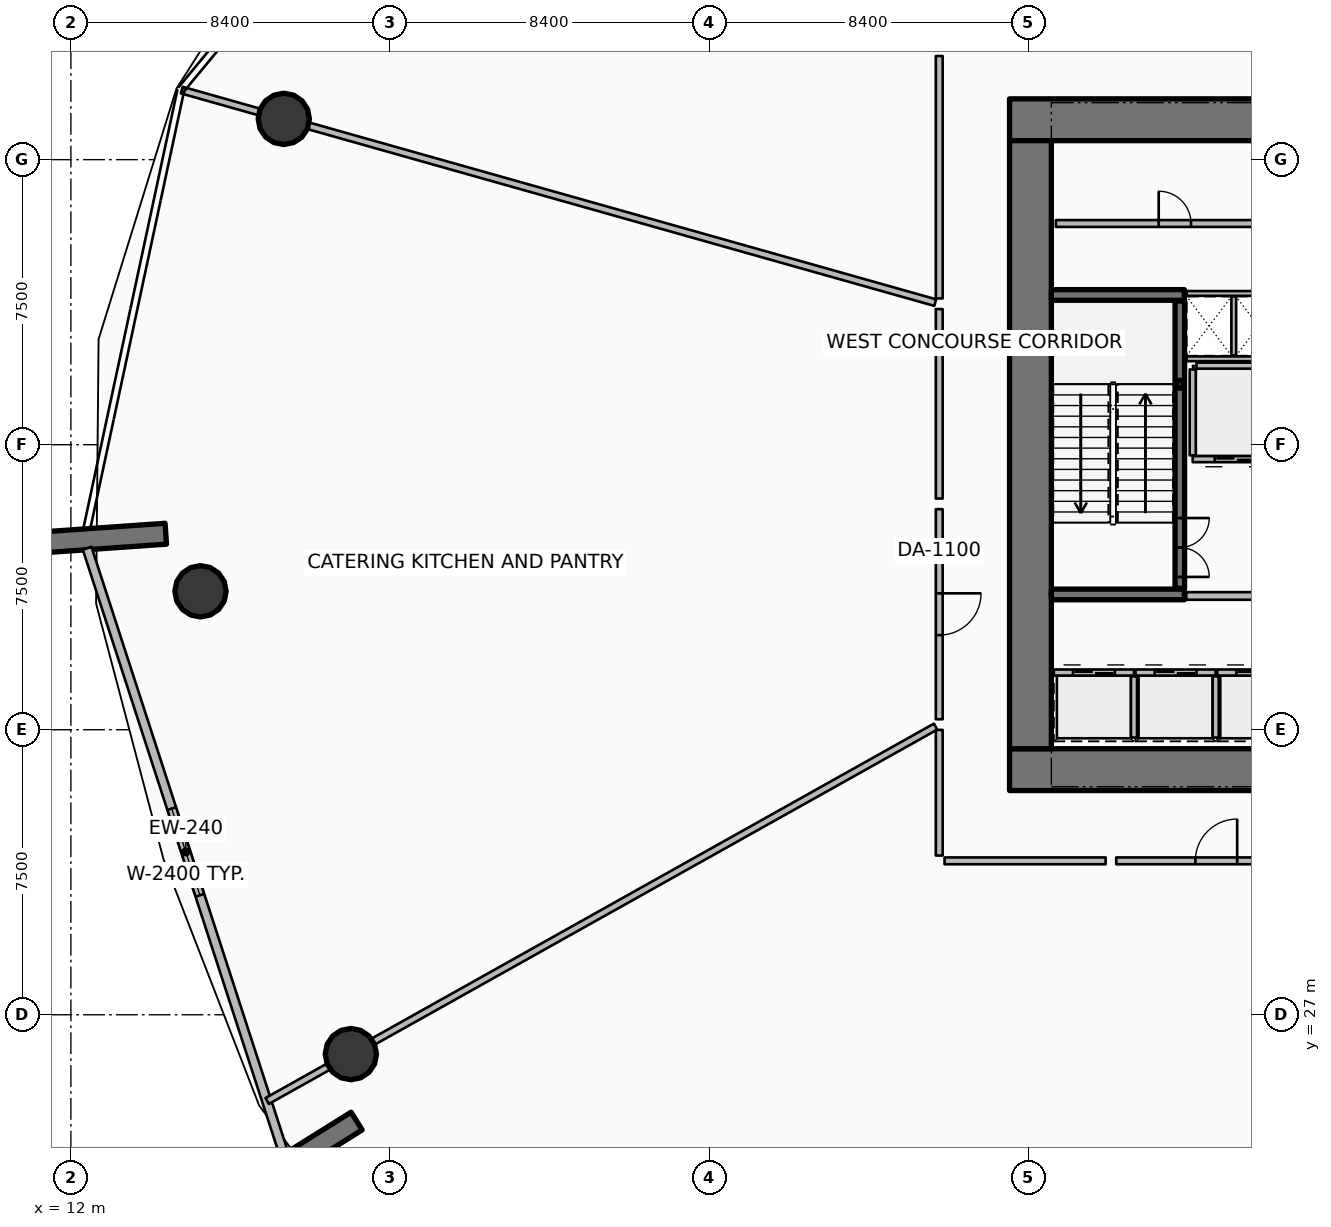
"""IFC4 building model, lengths in metres.
Left out: names, types, materials, properties, quantities, classifications, styles, units other than length and angle.
Written with IfcOpenShell. Run it as: python <this file> out.ifc"""

import sys

from ifc_helpers import new_model, si_unit, direction, frame, frame_2d, origin, origin_2d, place, context, subcontext, project, spatial, rectangle, hollow_rectangle, circle, extrude, element, fill, save


model = new_model("IFC4")
c1 = context("Model", 3, precision=1e-05, world=origin(), true_north=direction((0.0, 1.0)))
c2 = subcontext(c1, "Body", "Model", "MODEL_VIEW")
j1 = project(units=[si_unit("LENGTHUNIT", "METRE"), si_unit("PLANEANGLEUNIT", "RADIAN")], contexts=[c1])
p1 = place(None, origin())
s1 = spatial("IfcSite", under=j1, at=p1, CompositionType="ELEMENT")
p2 = place(p1, origin())
s2 = spatial("IfcBuilding", under=s1, at=p2, CompositionType="ELEMENT")
p3 = place(p2, frame((0.0, 0.0, 7.2)))
s3 = spatial("IfcBuildingStorey", under=s2, at=p3, CompositionType="ELEMENT", Elevation=7.2)
for number, where, z_axis, x_axis in (
    (1, (36.7, 33.45, 0.0), (0.0, 0.0, 1.0), (1.0, 0.0, 0.0)),
    (2, (36.7, 50.55, 0.0), (0.0, 0.0, 1.0), (1.0, 0.0, 0.0)),
):
    element("IfcWall", number, at=place(p3, frame(where, z_axis=z_axis, x_axis=x_axis)), inside=s3, PredefinedType="SHEAR", context=c2, shape_type="SweptSolid", body=[
        extrude(rectangle(XDim=10.2, YDim=1.1, at=frame_2d((5.1, 0.0))), origin(), (0.0, 0.0, 1.0), 4.8),
    ])
p4 = place(p3, frame((37.25, 34.0, 0.0), z_axis=(0.0, 0.0, 1.0), x_axis=(0.0, 1.0, 0.0)))
e3 = element("IfcWall", 3, at=p4, inside=s3, PredefinedType="SHEAR", context=c2, shape_type="SweptSolid", body=[
    extrude(rectangle(XDim=16.0, YDim=1.1, at=frame_2d((8.0, 0.0))), origin(), (0.0, 0.0, 1.0), 4.8),
])
for number, where, z_axis, x_axis in (
    (4, (37.8, 38.06, 0.0), (0.0, 0.0, 1.0), (1.0, 0.0, 0.0)),
    (5, (37.8, 45.94, 0.0), (0.0, 0.0, 1.0), (1.0, 0.0, 0.0)),
):
    element("IfcWall", number, at=place(p3, frame(where, z_axis=z_axis, x_axis=x_axis)), inside=s3, PredefinedType="SHEAR", context=c2, shape_type="SweptSolid", body=[
        extrude(rectangle(XDim=3.5, YDim=0.28, at=frame_2d((1.75, 0.0))), origin(), (0.0, 0.0, 1.0), 4.8),
    ])
p5 = place(p3, frame((41.18, 43.59, 0.0), z_axis=(0.0, 0.0, 1.0), x_axis=(1.0, 0.0, 0.0)))
e6 = element("IfcColumn", 6, at=p5, inside=s3, PredefinedType="COLUMN", context=c2, shape_type="SweptSolid", body=[
    extrude(hollow_rectangle(XDim=0.2, YDim=0.2, WallThickness=0.01, InnerFilletRadius=0.01, OuterFilletRadius=0.02, at=origin_2d()), origin(), (0.0, 0.0, 1.0), 2.195),
])
for number, where, z_axis, x_axis in (
    (7, (14.497, 39.657, 0.0), (0.0, 0.0, 1.0), (-0.998, -0.07, 0.0)),
    (8, (19.519, 24.203, 0.0), (0.0, 0.0, 1.0), (-0.848, -0.53, 0.0)),
):
    element("IfcWall", number, at=place(p3, frame(where, z_axis=z_axis, x_axis=x_axis)), inside=s3, PredefinedType="SOLIDWALL", context=c2, shape_type="SweptSolid", body=[
        extrude(rectangle(XDim=3.5, YDim=0.55, at=frame_2d((1.75, 0.0))), origin(), (0.0, 0.0, 1.0), 4.8),
    ])
for number, where, z_axis, x_axis in (
    (9, (17.602, 50.573, 0.0), (0.0, 0.0, 1.0), (1.0, 0.0, 0.0)),
    (10, (15.41, 38.143, 0.0), (0.0, 0.0, 1.0), (1.0, 0.0, 0.0)),
    (11, (19.367, 25.965, 0.0), (0.0, 0.0, 1.0), (1.0, 0.0, 0.0)),
):
    element("IfcColumn", number, at=place(p3, frame(where, z_axis=z_axis, x_axis=x_axis)), inside=s3, PredefinedType="COLUMN", context=c2, shape_type="SweptSolid", body=[
        extrude(circle(Radius=0.675, at=origin_2d()), origin(), (0.0, 0.0, 1.0), 4.48),
    ])
p6 = place(p3, frame((12.427, 39.275, 0.0), z_axis=(0.0, 0.0, 1.0), x_axis=(0.309022005354, -0.951054888115, 0.0)))
e12 = element("IfcWall", 12, at=p6, inside=s3, PredefinedType="SOLIDWALL", context=c2, shape_type="SweptSolid", body=[
    extrude(rectangle(XDim=16.803, YDim=0.24, at=frame_2d((8.401, 0.0))), origin(), (0.0, 0.0, 1.0), 3.43),
])
p7 = place(p6, frame((7.201, 0.0, 0.85)))
e13 = element("IfcOpeningElement", 13, at=p7, cuts=e12, PredefinedType="OPENING", context=c2, shape_type="SweptSolid", body=[
    extrude(rectangle(XDim=2.4, YDim=2.1, at=frame_2d((1.2, 1.05))), frame((0.0, 0.13, 0.0), z_axis=(0.0, -1.0, 0.0), x_axis=(1.0, 0.0, 0.0)), (0.0, 0.0, 1.0), 0.26),
])
p8 = place(p3, frame((41.18, 38.22, 0.0), z_axis=(0.0, 0.0, 1.0), x_axis=(0.0, 1.0, 0.0)))
e14 = element("IfcWall", 14, at=p8, inside=s3, PredefinedType="SOLIDWALL", context=c2, shape_type="SweptSolid", body=[
    extrude(rectangle(XDim=7.56, YDim=0.25, at=frame_2d((3.78, 0.0))), origin(), (0.0, 0.0, 1.0), 4.48),
])
p9 = place(p8, frame((0.3, 0.0, 0.0)))
e15 = element("IfcOpeningElement", 15, at=p9, cuts=e14, PredefinedType="OPENING", context=c2, shape_type="SweptSolid", body=[
    extrude(rectangle(XDim=1.55, YDim=2.15, at=frame_2d((0.775, 1.075))), frame((0.0, 0.135, 0.0), z_axis=(0.0, -1.0, 0.0), x_axis=(1.0, 0.0, 0.0)), (0.0, 0.0, 1.0), 0.27),
])
p10 = place(p3, frame((37.865, 36.005, 0.0), z_axis=(0.0, 0.0, 1.0), x_axis=(1.0, 0.0, 0.0)))
e16 = element("IfcWall", 16, at=p10, inside=s3, PredefinedType="PARTITIONING", context=c2, shape_type="SweptSolid", body=[
    extrude(rectangle(XDim=2.11, YDim=0.16, at=frame_2d((1.055, 0.0))), origin(), (0.0, 0.0, 1.0), 4.48),
])
p11 = place(p10, frame((0.505, 0.0, 0.0)))
e17 = element("IfcOpeningElement", 17, at=p11, cuts=e16, PredefinedType="OPENING", context=c2, shape_type="SweptSolid", body=[
    extrude(rectangle(XDim=1.1, YDim=2.1, at=frame_2d((0.55, 1.05))), frame((0.0, 0.09, 0.0), z_axis=(0.0, -1.0, 0.0), x_axis=(1.0, 0.0, 0.0)), (0.0, 0.0, 1.0), 0.18),
])
p12 = place(p3, frame((39.975, 34.295, 0.0), z_axis=(0.0, 0.0, 1.0), x_axis=(0.0, 1.0, 0.0)))
e18 = element("IfcWall", 18, at=p12, inside=s3, PredefinedType="PARTITIONING", context=c2, shape_type="SweptSolid", body=[
    extrude(rectangle(XDim=1.61, YDim=0.16, at=frame_2d((0.805, 0.0))), origin(), (0.0, 0.0, 1.0), 4.48),
])
p13 = place(p3, frame((40.015, 36.005, 0.0), z_axis=(0.0, 0.0, 1.0), x_axis=(1.0, 0.0, 0.0)))
e19 = element("IfcWall", 19, at=p13, inside=s3, PredefinedType="PARTITIONING", context=c2, shape_type="SweptSolid", body=[
    extrude(rectangle(XDim=2.11, YDim=0.16, at=frame_2d((1.055, 0.0))), origin(), (0.0, 0.0, 1.0), 4.48),
])
p14 = place(p13, frame((0.505, 0.0, 0.0)))
e20 = element("IfcOpeningElement", 20, at=p14, cuts=e19, PredefinedType="OPENING", context=c2, shape_type="SweptSolid", body=[
    extrude(rectangle(XDim=1.1, YDim=2.1, at=frame_2d((0.55, 1.05))), frame((0.0, 0.09, 0.0), z_axis=(0.0, -1.0, 0.0), x_axis=(1.0, 0.0, 0.0)), (0.0, 0.0, 1.0), 0.18),
])
p15 = place(p3, frame((42.125, 34.295, 0.0), z_axis=(0.0, 0.0, 1.0), x_axis=(0.0, 1.0, 0.0)))
e21 = element("IfcWall", 21, at=p15, inside=s3, PredefinedType="PARTITIONING", context=c2, shape_type="SweptSolid", body=[
    extrude(rectangle(XDim=1.61, YDim=0.16, at=frame_2d((0.805, 0.0))), origin(), (0.0, 0.0, 1.0), 4.48),
])
p16 = place(p3, frame((42.165, 36.005, 0.0), z_axis=(0.0, 0.0, 1.0), x_axis=(1.0, 0.0, 0.0)))
e22 = element("IfcWall", 22, at=p16, inside=s3, PredefinedType="PARTITIONING", context=c2, shape_type="SweptSolid", body=[
    extrude(rectangle(XDim=2.11, YDim=0.16, at=frame_2d((1.055, 0.0))), origin(), (0.0, 0.0, 1.0), 4.48),
])
p17 = place(p16, frame((0.505, 0.0, 0.0)))
e23 = element("IfcOpeningElement", 23, at=p17, cuts=e22, PredefinedType="OPENING", context=c2, shape_type="SweptSolid", body=[
    extrude(rectangle(XDim=1.1, YDim=2.1, at=frame_2d((0.55, 1.05))), frame((0.0, 0.09, 0.0), z_axis=(0.0, -1.0, 0.0), x_axis=(1.0, 0.0, 0.0)), (0.0, 0.0, 1.0), 0.18),
])
p18 = place(p3, frame((43.78, 41.62, 0.0), z_axis=(0.0, 0.0, 1.0), x_axis=(-1.0, 0.0, 0.0)))
e24 = element("IfcWall", 24, at=p18, inside=s3, PredefinedType="PARTITIONING", context=c2, shape_type="SweptSolid", body=[
    extrude(rectangle(XDim=2.26, YDim=0.16, at=frame_2d((1.13, 0.0))), origin(), (0.0, 0.0, 1.0), 4.48),
])
p19 = place(p18, frame((0.58, 0.0, 0.0)))
e25 = element("IfcOpeningElement", 25, at=p19, cuts=e24, PredefinedType="OPENING", context=c2, shape_type="SweptSolid", body=[
    extrude(rectangle(XDim=1.1, YDim=2.1, at=frame_2d((0.55, 1.05))), frame((0.0, 0.09, 0.0), z_axis=(0.0, -1.0, 0.0), x_axis=(1.0, 0.0, 0.0)), (0.0, 0.0, 1.0), 0.18),
])
p20 = place(p3, frame((41.52, 41.72, 0.0), z_axis=(0.0, 0.0, 1.0), x_axis=(0.0, 1.0, 0.0)))
e26 = element("IfcWall", 26, at=p20, inside=s3, PredefinedType="PARTITIONING", context=c2, shape_type="SweptSolid", body=[
    extrude(rectangle(XDim=2.26, YDim=0.16, at=frame_2d((1.13, 0.0))), origin(), (0.0, 0.0, 1.0), 4.48),
])
p21 = place(p3, frame((41.62, 44.08, 0.0), z_axis=(0.0, 0.0, 1.0), x_axis=(1.0, 0.0, 0.0)))
e27 = element("IfcWall", 27, at=p21, inside=s3, PredefinedType="PARTITIONING", context=c2, shape_type="SweptSolid", body=[
    extrude(rectangle(XDim=2.06, YDim=0.16, at=frame_2d((1.03, 0.0))), origin(), (0.0, 0.0, 1.0), 4.48),
])
p22 = place(p3, frame((37.92, 47.82, 0.0), z_axis=(0.0, 0.0, 1.0), x_axis=(1.0, 0.0, 0.0)))
e28 = element("IfcWall", 28, at=p22, inside=s3, PredefinedType="PARTITIONING", context=c2, shape_type="SweptSolid", body=[
    extrude(rectangle(XDim=6.26, YDim=0.18, at=frame_2d((3.13, 0.0))), origin(), (0.0, 0.0, 1.0), 4.48),
])
p23 = place(p22, frame((2.705, 0.0, 0.0)))
e29 = element("IfcOpeningElement", 29, at=p23, cuts=e28, PredefinedType="OPENING", context=c2, shape_type="SweptSolid", body=[
    extrude(rectangle(XDim=0.85, YDim=2.06, at=frame_2d((0.425, 1.03))), frame((0.0, 0.1, 0.0), z_axis=(0.0, -1.0, 0.0), x_axis=(1.0, 0.0, 0.0)), (0.0, 0.0, 1.0), 0.2),
])
p24 = place(p3, frame((41.35, 38.02, 0.0), z_axis=(0.0, 0.0, 1.0), x_axis=(1.0, 0.0, 0.0)))
e30 = element("IfcWall", 30, at=p24, inside=s3, PredefinedType="PARTITIONING", context=c2, shape_type="SweptSolid", body=[
    extrude(rectangle(XDim=5.37, YDim=0.2, at=frame_2d((2.685, 0.0))), origin(), (0.0, 0.0, 1.0), 4.48),
])
p25 = place(p3, frame((41.36, 45.98, 0.0), z_axis=(0.0, 0.0, 1.0), x_axis=(1.0, 0.0, 0.0)))
e31 = element("IfcWall", 31, at=p25, inside=s3, PredefinedType="PARTITIONING", context=c2, shape_type="SweptSolid", body=[
    extrude(rectangle(XDim=5.36, YDim=0.125, at=frame_2d((2.68, 0.0))), origin(), (0.0, 0.0, 1.0), 3.92),
])
p26 = place(p3, frame((41.36, 44.26, 0.0), z_axis=(0.0, 0.0, 1.0), x_axis=(1.0, 0.0, 0.0)))
e32 = element("IfcWall", 32, at=p26, inside=s3, PredefinedType="PARTITIONING", context=c2, shape_type="SweptSolid", body=[
    extrude(rectangle(XDim=2.5, YDim=0.125, at=frame_2d((1.25, 0.0))), origin(), (0.0, 0.0, 1.0), 3.92),
])
p27 = place(p3, frame((42.6, 44.35, 0.0), z_axis=(0.0, 0.0, 1.0), x_axis=(0.0, 1.0, 0.0)))
e33 = element("IfcWall", 33, at=p27, inside=s3, PredefinedType="PARTITIONING", context=c2, shape_type="SweptSolid", body=[
    extrude(rectangle(XDim=1.55, YDim=0.125, at=frame_2d((0.775, 0.0))), origin(), (0.0, 0.0, 1.0), 3.92),
])
p28 = place(p3, frame((34.85, 52.227, 0.0), z_axis=(0.0, 0.0, 1.0), x_axis=(0.0, -1.0, 0.0)))
e34 = element("IfcWall", 34, at=p28, inside=s3, PredefinedType="PARTITIONING", context=c2, shape_type="SweptSolid", body=[
    extrude(rectangle(XDim=6.378, YDim=0.18, at=frame_2d((3.189, 0.0))), origin(), (0.0, 0.0, 1.0), 3.693),
])
p29 = place(p3, frame((34.744, 45.739, 0.0), z_axis=(0.0, 0.0, 1.0), x_axis=(-0.96245531293, 0.271440178702, 0.0)))
e35 = element("IfcWall", 35, at=p29, inside=s3, PredefinedType="PARTITIONING", context=c2, shape_type="SweptSolid", body=[
    extrude(rectangle(XDim=20.6, YDim=0.18, at=frame_2d((10.3, 0.0))), origin(), (0.0, 0.0, 1.0), 3.693),
])
p30 = place(p3, frame((34.85, 45.569, 0.0), z_axis=(0.0, 0.0, 1.0), x_axis=(0.0, -1.0, 0.0)))
e36 = element("IfcWall", 36, at=p30, inside=s3, PredefinedType="PARTITIONING", context=c2, shape_type="SweptSolid", body=[
    extrude(rectangle(XDim=4.985, YDim=0.18, at=frame_2d((2.493, 0.0))), origin(), (0.0, 0.0, 1.0), 3.693),
])
p31 = place(p3, frame((34.85, 40.304, 0.0), z_axis=(0.0, 0.0, 1.0), x_axis=(0.0, -1.0, 0.0)))
e37 = element("IfcWall", 37, at=p31, inside=s3, PredefinedType="PARTITIONING", context=c2, shape_type="SweptSolid", body=[
    extrude(rectangle(XDim=5.528, YDim=0.18, at=frame_2d((2.764, 0.0))), origin(), (0.0, 0.0, 1.0), 3.693),
])
p32 = place(p31, frame((2.214, 0.0, 0.0)))
e38 = element("IfcOpeningElement", 38, at=p32, cuts=e37, PredefinedType="OPENING", context=c2, shape_type="SweptSolid", body=[
    extrude(rectangle(XDim=1.1, YDim=2.1, at=frame_2d((0.55, 1.05))), frame((0.0, 0.1, 0.0), z_axis=(0.0, -1.0, 0.0), x_axis=(1.0, 0.0, 0.0)), (0.0, 0.0, 1.0), 0.2),
])
p33 = place(p3, frame((34.754, 34.582, 0.0), z_axis=(0.0, 0.0, 1.0), x_axis=(-0.872493211438, -0.488626233429, 0.0)))
e39 = element("IfcWall", 39, at=p33, inside=s3, PredefinedType="PARTITIONING", context=c2, shape_type="SweptSolid", body=[
    extrude(rectangle(XDim=20.159, YDim=0.18, at=frame_2d((10.079, 0.0))), origin(), (0.0, 0.0, 1.0), 3.693),
])
p34 = place(p3, frame((34.85, 34.496, 0.0), z_axis=(0.0, 0.0, 1.0), x_axis=(0.0, -1.0, 0.0)))
e40 = element("IfcWall", 40, at=p34, inside=s3, PredefinedType="PARTITIONING", context=c2, shape_type="SweptSolid", body=[
    extrude(rectangle(XDim=3.306, YDim=0.18, at=frame_2d((1.653, 0.0))), origin(), (0.0, 0.0, 1.0), 3.693),
])
p35 = place(p3, frame((34.99, 31.05, 0.0), z_axis=(0.0, 0.0, 1.0), x_axis=(1.0, 0.0, 0.0)))
e41 = element("IfcWall", 41, at=p35, inside=s3, PredefinedType="PARTITIONING", context=c2, shape_type="SweptSolid", body=[
    extrude(rectangle(XDim=4.238, YDim=0.18, at=frame_2d((2.119, 0.0))), origin(), (0.0, 0.0, 1.0), 3.693),
])
p36 = place(p3, frame((39.508, 31.05, 0.0), z_axis=(0.0, 0.0, 1.0), x_axis=(1.0, 0.0, 0.0)))
e42 = element("IfcWall", 42, at=p36, inside=s3, PredefinedType="PARTITIONING", context=c2, shape_type="SweptSolid", body=[
    extrude(rectangle(XDim=5.264, YDim=0.18, at=frame_2d((2.632, 0.0))), origin(), (0.0, 0.0, 1.0), 3.693),
])
p37 = place(p36, frame((2.082, 0.0, 0.0)))
e43 = element("IfcOpeningElement", 43, at=p37, cuts=e42, PredefinedType="OPENING", context=c2, shape_type="SweptSolid", body=[
    extrude(rectangle(XDim=1.1, YDim=2.1, at=frame_2d((0.55, 1.05))), frame((0.0, 0.1, 0.0), z_axis=(0.0, -1.0, 0.0), x_axis=(1.0, 0.0, 0.0)), (0.0, 0.0, 1.0), 0.2),
])
p38 = place(p7, origin())
e44 = element("IfcWindow", 44, at=p38, inside=s3, PartitioningType="SINGLE_PANEL", PredefinedType="WINDOW", context=c2, shape_type="SweptSolid", body=[
    extrude(rectangle(XDim=2.4, YDim=2.1, at=frame_2d((1.2, 1.05))), frame((0.0, 0.03, 0.0), z_axis=(0.0, -1.0, 0.0), x_axis=(1.0, 0.0, 0.0)), (0.0, 0.0, 1.0), 0.06),
])
fill(e13, e44)
p39 = place(p9, origin())
e45 = element("IfcDoor", 45, at=p39, inside=s3, OperationType="DOUBLE_DOOR_SINGLE_SWING", PredefinedType="DOOR", context=c2, shape_type="SweptSolid", body=[
    extrude(rectangle(XDim=1.55, YDim=2.15, at=frame_2d((0.775, 1.075))), frame((0.0, 0.025, 0.0), z_axis=(0.0, -1.0, 0.0), x_axis=(1.0, 0.0, 0.0)), (0.0, 0.0, 1.0), 0.05),
])
fill(e15, e45)
p40 = place(p11, origin())
e46 = element("IfcDoor", 46, at=p40, inside=s3, OperationType="DOUBLE_DOOR_SLIDING", PredefinedType="DOOR", context=c2, shape_type="SweptSolid", body=[
    extrude(rectangle(XDim=1.1, YDim=2.1, at=frame_2d((0.55, 1.05))), frame((0.0, 0.025, 0.0), z_axis=(0.0, -1.0, 0.0), x_axis=(1.0, 0.0, 0.0)), (0.0, 0.0, 1.0), 0.05),
])
fill(e17, e46)
p41 = place(p14, origin())
e47 = element("IfcDoor", 47, at=p41, inside=s3, OperationType="DOUBLE_DOOR_SLIDING", PredefinedType="DOOR", context=c2, shape_type="SweptSolid", body=[
    extrude(rectangle(XDim=1.1, YDim=2.1, at=frame_2d((0.55, 1.05))), frame((0.0, 0.025, 0.0), z_axis=(0.0, -1.0, 0.0), x_axis=(1.0, 0.0, 0.0)), (0.0, 0.0, 1.0), 0.05),
])
fill(e20, e47)
p42 = place(p17, origin())
e48 = element("IfcDoor", 48, at=p42, inside=s3, OperationType="DOUBLE_DOOR_SLIDING", PredefinedType="DOOR", context=c2, shape_type="SweptSolid", body=[
    extrude(rectangle(XDim=1.1, YDim=2.1, at=frame_2d((0.55, 1.05))), frame((0.0, 0.025, 0.0), z_axis=(0.0, -1.0, 0.0), x_axis=(1.0, 0.0, 0.0)), (0.0, 0.0, 1.0), 0.05),
])
fill(e23, e48)
p43 = place(p19, origin())
e49 = element("IfcDoor", 49, at=p43, inside=s3, OperationType="DOUBLE_DOOR_SLIDING", PredefinedType="DOOR", context=c2, shape_type="SweptSolid", body=[
    extrude(rectangle(XDim=1.1, YDim=2.1, at=frame_2d((0.55, 1.05))), frame((0.0, 0.025, 0.0), z_axis=(0.0, -1.0, 0.0), x_axis=(1.0, 0.0, 0.0)), (0.0, 0.0, 1.0), 0.05),
])
fill(e25, e49)
p44 = place(p23, origin())
e50 = element("IfcDoor", 50, at=p44, inside=s3, OperationType="SINGLE_SWING_LEFT", PredefinedType="DOOR", context=c2, shape_type="SweptSolid", body=[
    extrude(rectangle(XDim=0.85, YDim=2.06, at=frame_2d((0.425, 1.03))), frame((0.0, 0.025, 0.0), z_axis=(0.0, -1.0, 0.0), x_axis=(1.0, 0.0, 0.0)), (0.0, 0.0, 1.0), 0.05),
])
fill(e29, e50)
p45 = place(p32, origin())
e51 = element("IfcDoor", 51, at=p45, inside=s3, OperationType="SINGLE_SWING_LEFT", PredefinedType="DOOR", context=c2, shape_type="SweptSolid", body=[
    extrude(rectangle(XDim=1.1, YDim=2.1, at=frame_2d((0.55, 1.05))), frame((0.0, 0.025, 0.0), z_axis=(0.0, -1.0, 0.0), x_axis=(1.0, 0.0, 0.0)), (0.0, 0.0, 1.0), 0.05),
])
fill(e38, e51)
p46 = place(p37, origin())
e52 = element("IfcDoor", 52, at=p46, inside=s3, OperationType="SINGLE_SWING_RIGHT", PredefinedType="DOOR", context=c2, shape_type="SweptSolid", body=[
    extrude(rectangle(XDim=1.1, YDim=2.1, at=frame_2d((0.55, 1.05))), frame((0.0, 0.025, 0.0), z_axis=(0.0, -1.0, 0.0), x_axis=(1.0, 0.0, 0.0)), (0.0, 0.0, 1.0), 0.05),
])
fill(e43, e52)
save(model, sys.argv[1])
